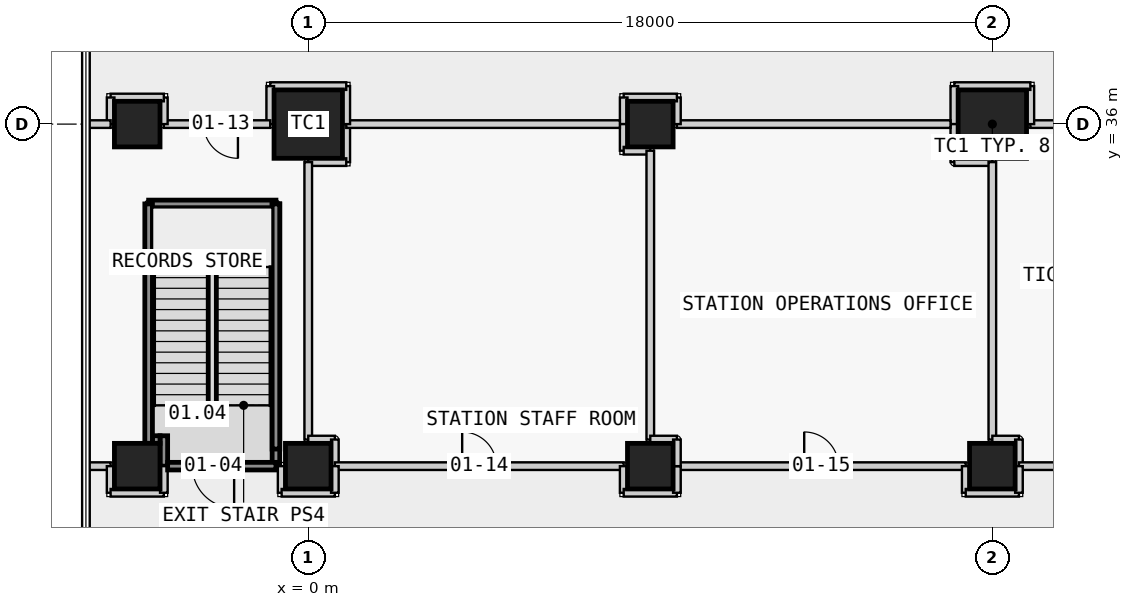
"""IFC4 building model, lengths in metres.
Left out: names, types, materials, properties, quantities, classifications, styles, units other than length and angle.
Written with IfcOpenShell. Run it as: python <this file> out.ifc"""

import sys

from ifc_helpers import new_model, si_unit, direction, frame, frame_2d, origin, origin_2d, place, context, subcontext, project, spatial, rectangle, extrude, element, fill, save


model = new_model("IFC4")
c1 = context("Model", 3, precision=1e-05, world=origin(), true_north=direction((0.0, 1.0)))
c2 = subcontext(c1, "Body", "Model", "MODEL_VIEW")
j1 = project(units=[si_unit("LENGTHUNIT", "METRE"), si_unit("PLANEANGLEUNIT", "RADIAN")], contexts=[c1])
p1 = place(None, origin())
s1 = spatial("IfcSite", under=j1, at=p1, CompositionType="ELEMENT")
p2 = place(p1, origin())
s2 = spatial("IfcBuilding", under=s1, at=p2, CompositionType="ELEMENT")
p3 = place(p2, frame((0.0, 0.0, 8.0)))
s3 = spatial("IfcBuildingStorey", under=s2, at=p3, CompositionType="ELEMENT", Elevation=8.0)
for number, where, z_axis, x_axis in (
    (1, (-4.5, 27.0, 0.0), (0.0, 0.0, 1.0), (1.0, 0.0, 0.0)),
    (2, (-4.5, 36.0, 0.0), (0.0, 0.0, 1.0), (1.0, 0.0, 0.0)),
    (3, (0.0, 27.0, 0.0), (0.0, 0.0, 1.0), (1.0, 0.0, 0.0)),
):
    element("IfcColumn", number, at=place(p3, frame(where, z_axis=z_axis, x_axis=x_axis)), inside=s3, PredefinedType="COLUMN", context=c2, shape_type="SweptSolid", body=[
        extrude(rectangle(XDim=1.2, YDim=1.2, at=origin_2d()), origin(), (0.0, 0.0, 1.0), 4.8),
    ])
p4 = place(p3, frame((0.0, 36.0, 0.0), z_axis=(0.0, 0.0, 1.0), x_axis=(1.0, 0.0, 0.0)))
e4 = element("IfcColumn", 4, at=p4, inside=s3, PredefinedType="COLUMN", context=c2, shape_type="SweptSolid", body=[
    extrude(rectangle(XDim=1.8, YDim=1.8, at=origin_2d()), origin(), (0.0, 0.0, 1.0), 4.8),
])
for number, where, z_axis, x_axis in (
    (5, (9.0, 27.0, 0.0), (0.0, 0.0, 1.0), (1.0, 0.0, 0.0)),
    (6, (9.0, 36.0, 0.0), (0.0, 0.0, 1.0), (1.0, 0.0, 0.0)),
    (7, (18.0, 27.0, 0.0), (0.0, 0.0, 1.0), (1.0, 0.0, 0.0)),
):
    element("IfcColumn", number, at=place(p3, frame(where, z_axis=z_axis, x_axis=x_axis)), inside=s3, PredefinedType="COLUMN", context=c2, shape_type="SweptSolid", body=[
        extrude(rectangle(XDim=1.2, YDim=1.2, at=origin_2d()), origin(), (0.0, 0.0, 1.0), 4.8),
    ])
p5 = place(p3, frame((18.0, 36.0, 0.0), z_axis=(0.0, 0.0, 1.0), x_axis=(1.0, 0.0, 0.0)))
e8 = element("IfcColumn", 8, at=p5, inside=s3, PredefinedType="COLUMN", context=c2, shape_type="SweptSolid", body=[
    extrude(rectangle(XDim=1.8, YDim=1.8, at=origin_2d()), origin(), (0.0, 0.0, 1.0), 4.8),
])
p6 = place(p3, frame((26.3, 36.0, 0.0), z_axis=(0.0, 0.0, 1.0), x_axis=(-1.0, 0.0, 0.0)))
e9 = element("IfcWall", 9, at=p6, inside=s3, PredefinedType="PARTITIONING", context=c2, shape_type="SweptSolid", body=[
    extrude(rectangle(XDim=7.3, YDim=0.2, at=frame_2d((3.65, 0.0))), origin(), (0.0, 0.0, 1.0), 3.75),
])
p7 = place(p6, frame((3.1, 0.0, 0.0)))
e10 = element("IfcOpeningElement", 10, at=p7, cuts=e9, PredefinedType="OPENING", context=c2, shape_type="SweptSolid", body=[
    extrude(rectangle(XDim=0.9, YDim=2.1, at=frame_2d((0.45, 1.05))), frame((0.0, 0.11, 0.0), z_axis=(0.0, -1.0, 0.0), x_axis=(1.0, 0.0, 0.0)), (0.0, 0.0, 1.0), 0.22),
])
p8 = place(p3, frame((19.0, 36.0, 0.0), z_axis=(0.0, 0.0, 1.0), x_axis=(0.0, 1.0, 0.0)))
e11 = element("IfcWall", 11, at=p8, inside=s3, PredefinedType="PARTITIONING", context=c2, shape_type="SweptSolid", body=[
    extrude(rectangle(XDim=1.0, YDim=0.2, at=frame_2d((0.5, 0.0))), origin(), (0.0, 0.0, 1.0), 3.75),
])
p9 = place(p3, frame((19.0, 37.0, 0.0), z_axis=(0.0, 0.0, 1.0), x_axis=(-1.0, 0.0, 0.0)))
e12 = element("IfcWall", 12, at=p9, inside=s3, PredefinedType="PARTITIONING", context=c2, shape_type="SweptSolid", body=[
    extrude(rectangle(XDim=2.0, YDim=0.2, at=frame_2d((1.0, 0.0))), origin(), (0.0, 0.0, 1.0), 3.75),
])
for number, where, z_axis, x_axis in (
    (13, (17.0, 37.0, 0.0), (0.0, 0.0, 1.0), (0.0, -1.0, 0.0)),
    (14, (17.0, 36.0, 0.0), (0.0, 0.0, 1.0), (0.0, -1.0, 0.0)),
    (15, (17.0, 35.0, 0.0), (0.0, 0.0, 1.0), (1.0, 0.0, 0.0)),
):
    element("IfcWall", number, at=place(p3, frame(where, z_axis=z_axis, x_axis=x_axis)), inside=s3, PredefinedType="PARTITIONING", context=c2, shape_type="SweptSolid", body=[
        extrude(rectangle(XDim=1.0, YDim=0.2, at=frame_2d((0.5, 0.0))), origin(), (0.0, 0.0, 1.0), 3.75),
    ])
p10 = place(p3, frame((18.0, 35.0, 0.0), z_axis=(0.0, 0.0, 1.0), x_axis=(0.0, -1.0, 0.0)))
e16 = element("IfcWall", 16, at=p10, inside=s3, PredefinedType="PARTITIONING", context=c2, shape_type="SweptSolid", body=[
    extrude(rectangle(XDim=7.3, YDim=0.2, at=frame_2d((3.65, 0.0))), origin(), (0.0, 0.0, 1.0), 3.75),
])
for number, where, z_axis, x_axis in (
    (17, (18.0, 27.7, 0.0), (0.0, 0.0, 1.0), (1.0, 0.0, 0.0)),
    (18, (18.7, 27.7, 0.0), (0.0, 0.0, 1.0), (0.0, -1.0, 0.0)),
):
    element("IfcWall", number, at=place(p3, frame(where, z_axis=z_axis, x_axis=x_axis)), inside=s3, PredefinedType="PARTITIONING", context=c2, shape_type="SweptSolid", body=[
        extrude(rectangle(XDim=0.7, YDim=0.2, at=frame_2d((0.35, 0.0))), origin(), (0.0, 0.0, 1.0), 3.75),
    ])
for number, where, z_axis, x_axis in (
    (19, (1.0, 36.0, 0.0), (0.0, 0.0, 1.0), (0.0, -1.0, 0.0)),
    (20, (1.0, 35.0, 0.0), (0.0, 0.0, 1.0), (-1.0, 0.0, 0.0)),
):
    element("IfcWall", number, at=place(p3, frame(where, z_axis=z_axis, x_axis=x_axis)), inside=s3, PredefinedType="PARTITIONING", context=c2, shape_type="SweptSolid", body=[
        extrude(rectangle(XDim=1.0, YDim=0.2, at=frame_2d((0.5, 0.0))), origin(), (0.0, 0.0, 1.0), 3.75),
    ])
p11 = place(p3, frame((0.0, 35.0, 0.0), z_axis=(0.0, 0.0, 1.0), x_axis=(0.0, -1.0, 0.0)))
e21 = element("IfcWall", 21, at=p11, inside=s3, PredefinedType="PARTITIONING", context=c2, shape_type="SweptSolid", body=[
    extrude(rectangle(XDim=7.3, YDim=0.2, at=frame_2d((3.65, 0.0))), origin(), (0.0, 0.0, 1.0), 3.75),
])
for number, where, z_axis, x_axis in (
    (22, (0.0, 27.7, 0.0), (0.0, 0.0, 1.0), (1.0, 0.0, 0.0)),
    (23, (0.7, 27.7, 0.0), (0.0, 0.0, 1.0), (0.0, -1.0, 0.0)),
):
    element("IfcWall", number, at=place(p3, frame(where, z_axis=z_axis, x_axis=x_axis)), inside=s3, PredefinedType="PARTITIONING", context=c2, shape_type="SweptSolid", body=[
        extrude(rectangle(XDim=0.7, YDim=0.2, at=frame_2d((0.35, 0.0))), origin(), (0.0, 0.0, 1.0), 3.75),
    ])
p12 = place(p3, frame((18.7, 27.0, 0.0), z_axis=(0.0, 0.0, 1.0), x_axis=(1.0, 0.0, 0.0)))
e24 = element("IfcWall", 24, at=p12, inside=s3, PredefinedType="PARTITIONING", context=c2, shape_type="SweptSolid", body=[
    extrude(rectangle(XDim=7.6, YDim=0.2, at=frame_2d((3.8, 0.0))), origin(), (0.0, 0.0, 1.0), 3.75),
])
p13 = place(p3, frame((9.7, 27.0, 0.0), z_axis=(0.0, 0.0, 1.0), x_axis=(1.0, 0.0, 0.0)))
e25 = element("IfcWall", 25, at=p13, inside=s3, PredefinedType="PARTITIONING", context=c2, shape_type="SweptSolid", body=[
    extrude(rectangle(XDim=7.6, YDim=0.2, at=frame_2d((3.8, 0.0))), origin(), (0.0, 0.0, 1.0), 3.75),
])
p14 = place(p13, frame((3.35, 0.0, 0.0)))
e26 = element("IfcOpeningElement", 26, at=p14, cuts=e25, PredefinedType="OPENING", context=c2, shape_type="SweptSolid", body=[
    extrude(rectangle(XDim=0.9, YDim=2.1, at=frame_2d((0.45, 1.05))), frame((0.0, 0.11, 0.0), z_axis=(0.0, -1.0, 0.0), x_axis=(1.0, 0.0, 0.0)), (0.0, 0.0, 1.0), 0.22),
])
p15 = place(p3, frame((17.3, 27.0, 0.0), z_axis=(0.0, 0.0, 1.0), x_axis=(0.0, -1.0, 0.0)))
e27 = element("IfcWall", 27, at=p15, inside=s3, PredefinedType="PARTITIONING", context=c2, shape_type="SweptSolid", body=[
    extrude(rectangle(XDim=0.7, YDim=0.2, at=frame_2d((0.35, 0.0))), origin(), (0.0, 0.0, 1.0), 3.75),
])
p16 = place(p3, frame((17.3, 26.3, 0.0), z_axis=(0.0, 0.0, 1.0), x_axis=(1.0, 0.0, 0.0)))
e28 = element("IfcWall", 28, at=p16, inside=s3, PredefinedType="PARTITIONING", context=c2, shape_type="SweptSolid", body=[
    extrude(rectangle(XDim=1.4, YDim=0.2, at=frame_2d((0.7, 0.0))), origin(), (0.0, 0.0, 1.0), 4.45),
])
p17 = place(p3, frame((18.7, 26.3, 0.0), z_axis=(0.0, 0.0, 1.0), x_axis=(0.0, 1.0, 0.0)))
e29 = element("IfcWall", 29, at=p17, inside=s3, PredefinedType="PARTITIONING", context=c2, shape_type="SweptSolid", body=[
    extrude(rectangle(XDim=0.7, YDim=0.2, at=frame_2d((0.35, 0.0))), origin(), (0.0, 0.0, 1.0), 3.75),
])
p18 = place(p3, frame((0.7, 27.0, 0.0), z_axis=(0.0, 0.0, 1.0), x_axis=(1.0, 0.0, 0.0)))
e30 = element("IfcWall", 30, at=p18, inside=s3, PredefinedType="PARTITIONING", context=c2, shape_type="SweptSolid", body=[
    extrude(rectangle(XDim=7.6, YDim=0.2, at=frame_2d((3.8, 0.0))), origin(), (0.0, 0.0, 1.0), 3.75),
])
p19 = place(p18, frame((3.35, 0.0, 0.0)))
e31 = element("IfcOpeningElement", 31, at=p19, cuts=e30, PredefinedType="OPENING", context=c2, shape_type="SweptSolid", body=[
    extrude(rectangle(XDim=0.9, YDim=2.1, at=frame_2d((0.45, 1.05))), frame((0.0, 0.11, 0.0), z_axis=(0.0, -1.0, 0.0), x_axis=(1.0, 0.0, 0.0)), (0.0, 0.0, 1.0), 0.22),
])
p20 = place(p3, frame((8.3, 27.0, 0.0), z_axis=(0.0, 0.0, 1.0), x_axis=(0.0, -1.0, 0.0)))
e32 = element("IfcWall", 32, at=p20, inside=s3, PredefinedType="PARTITIONING", context=c2, shape_type="SweptSolid", body=[
    extrude(rectangle(XDim=0.7, YDim=0.2, at=frame_2d((0.35, 0.0))), origin(), (0.0, 0.0, 1.0), 3.75),
])
p21 = place(p3, frame((8.3, 26.3, 0.0), z_axis=(0.0, 0.0, 1.0), x_axis=(1.0, 0.0, 0.0)))
e33 = element("IfcWall", 33, at=p21, inside=s3, PredefinedType="PARTITIONING", context=c2, shape_type="SweptSolid", body=[
    extrude(rectangle(XDim=1.4, YDim=0.2, at=frame_2d((0.7, 0.0))), origin(), (0.0, 0.0, 1.0), 4.45),
])
p22 = place(p3, frame((9.7, 26.3, 0.0), z_axis=(0.0, 0.0, 1.0), x_axis=(0.0, 1.0, 0.0)))
e34 = element("IfcWall", 34, at=p22, inside=s3, PredefinedType="PARTITIONING", context=c2, shape_type="SweptSolid", body=[
    extrude(rectangle(XDim=0.7, YDim=0.2, at=frame_2d((0.35, 0.0))), origin(), (0.0, 0.0, 1.0), 3.75),
])
p23 = place(p3, frame((-4.2, 33.9, 0.0), z_axis=(0.0, 0.0, 1.0), x_axis=(1.0, 0.0, 0.0)))
e35 = element("IfcWall", 35, at=p23, inside=s3, PredefinedType="PARTITIONING", context=c2, shape_type="SweptSolid", body=[
    extrude(rectangle(XDim=3.35, YDim=0.2, at=frame_2d((1.675, 0.0))), origin(), (0.0, 0.0, 1.0), 4.45),
])
p24 = place(p3, frame((-0.85, 33.9, 0.0), z_axis=(0.0, 0.0, 1.0), x_axis=(0.0, -1.0, 0.0)))
e36 = element("IfcWall", 36, at=p24, inside=s3, PredefinedType="PARTITIONING", context=c2, shape_type="SweptSolid", body=[
    extrude(rectangle(XDim=6.9, YDim=0.2, at=frame_2d((3.45, 0.0))), origin(), (0.0, 0.0, 1.0), 3.75),
])
p25 = place(p3, frame((16.9, 36.0, 0.0), z_axis=(0.0, 0.0, 1.0), x_axis=(-1.0, 0.0, 0.0)))
e37 = element("IfcWall", 37, at=p25, inside=s3, PredefinedType="PARTITIONING", context=c2, shape_type="SweptSolid", body=[
    extrude(rectangle(XDim=7.2, YDim=0.2, at=frame_2d((3.6, 0.0))), origin(), (0.0, 0.0, 1.0), 3.75),
])
p26 = place(p3, frame((9.7, 36.0, 0.0), z_axis=(0.0, 0.0, 1.0), x_axis=(0.0, 1.0, 0.0)))
e38 = element("IfcWall", 38, at=p26, inside=s3, PredefinedType="PARTITIONING", context=c2, shape_type="SweptSolid", body=[
    extrude(rectangle(XDim=0.7, YDim=0.2, at=frame_2d((0.35, 0.0))), origin(), (0.0, 0.0, 1.0), 3.75),
])
p27 = place(p3, frame((9.7, 36.7, 0.0), z_axis=(0.0, 0.0, 1.0), x_axis=(-1.0, 0.0, 0.0)))
e39 = element("IfcWall", 39, at=p27, inside=s3, PredefinedType="PARTITIONING", context=c2, shape_type="SweptSolid", body=[
    extrude(rectangle(XDim=1.4, YDim=0.2, at=frame_2d((0.7, 0.0))), origin(), (0.0, 0.0, 1.0), 4.45),
])
for number, where, z_axis, x_axis in (
    (40, (8.3, 36.7, 0.0), (0.0, 0.0, 1.0), (0.0, -1.0, 0.0)),
    (41, (8.3, 36.0, 0.0), (0.0, 0.0, 1.0), (0.0, -1.0, 0.0)),
    (42, (8.3, 35.3, 0.0), (0.0, 0.0, 1.0), (1.0, 0.0, 0.0)),
):
    element("IfcWall", number, at=place(p3, frame(where, z_axis=z_axis, x_axis=x_axis)), inside=s3, PredefinedType="PARTITIONING", context=c2, shape_type="SweptSolid", body=[
        extrude(rectangle(XDim=0.7, YDim=0.2, at=frame_2d((0.35, 0.0))), origin(), (0.0, 0.0, 1.0), 3.75),
    ])
p28 = place(p3, frame((9.0, 35.3, 0.0), z_axis=(0.0, 0.0, 1.0), x_axis=(0.0, -1.0, 0.0)))
e43 = element("IfcWall", 43, at=p28, inside=s3, PredefinedType="PARTITIONING", context=c2, shape_type="SweptSolid", body=[
    extrude(rectangle(XDim=7.6, YDim=0.2, at=frame_2d((3.8, 0.0))), origin(), (0.0, 0.0, 1.0), 3.75),
])
p29 = place(p3, frame((8.2, 36.0, 0.0), z_axis=(0.0, 0.0, 1.0), x_axis=(-1.0, 0.0, 0.0)))
e44 = element("IfcWall", 44, at=p29, inside=s3, PredefinedType="PARTITIONING", context=c2, shape_type="SweptSolid", body=[
    extrude(rectangle(XDim=7.2, YDim=0.2, at=frame_2d((3.6, 0.0))), origin(), (0.0, 0.0, 1.0), 3.75),
])
p30 = place(p3, frame((-3.8, 27.0, 0.0), z_axis=(0.0, 0.0, 1.0), x_axis=(0.0, 1.0, 0.0)))
e45 = element("IfcWall", 45, at=p30, inside=s3, PredefinedType="PARTITIONING", context=c2, shape_type="SweptSolid", body=[
    extrude(rectangle(XDim=0.8, YDim=0.2, at=frame_2d((0.4, 0.0))), origin(), (0.0, 0.0, 1.0), 3.75),
])
p31 = place(p3, frame((-3.9, 27.7, 0.0), z_axis=(0.0, 0.0, 1.0), x_axis=(-1.0, 0.0, 0.0)))
e46 = element("IfcWall", 46, at=p31, inside=s3, PredefinedType="PARTITIONING", context=c2, shape_type="SweptSolid", body=[
    extrude(rectangle(XDim=0.2, YDim=0.2, at=frame_2d((0.1, 0.0))), origin(), (0.0, 0.0, 1.0), 4.45),
])
p32 = place(p3, frame((-4.2, 27.6, 0.0), z_axis=(0.0, 0.0, 1.0), x_axis=(0.0, 1.0, 0.0)))
e47 = element("IfcWall", 47, at=p32, inside=s3, PredefinedType="PARTITIONING", context=c2, shape_type="SweptSolid", body=[
    extrude(rectangle(XDim=6.3, YDim=0.2, at=frame_2d((3.15, 0.0))), origin(), (0.0, 0.0, 1.0), 4.45),
])
p33 = place(p3, frame((1.0, 36.0, 0.0), z_axis=(0.0, 0.0, 1.0), x_axis=(0.0, 1.0, 0.0)))
e48 = element("IfcWall", 48, at=p33, inside=s3, PredefinedType="PARTITIONING", context=c2, shape_type="SweptSolid", body=[
    extrude(rectangle(XDim=1.0, YDim=0.2, at=frame_2d((0.5, 0.0))), origin(), (0.0, 0.0, 1.0), 3.75),
])
p34 = place(p3, frame((1.0, 37.0, 0.0), z_axis=(0.0, 0.0, 1.0), x_axis=(-1.0, 0.0, 0.0)))
e49 = element("IfcWall", 49, at=p34, inside=s3, PredefinedType="PARTITIONING", context=c2, shape_type="SweptSolid", body=[
    extrude(rectangle(XDim=2.0, YDim=0.2, at=frame_2d((1.0, 0.0))), origin(), (0.0, 0.0, 1.0), 3.75),
])
p35 = place(p3, frame((-1.0, 37.0, 0.0), z_axis=(0.0, 0.0, 1.0), x_axis=(0.0, -1.0, 0.0)))
e50 = element("IfcWall", 50, at=p35, inside=s3, PredefinedType="PARTITIONING", context=c2, shape_type="SweptSolid", body=[
    extrude(rectangle(XDim=1.0, YDim=0.2, at=frame_2d((0.5, 0.0))), origin(), (0.0, 0.0, 1.0), 3.75),
])
p36 = place(p3, frame((-1.0, 36.0, 0.0), z_axis=(0.0, 0.0, 1.0), x_axis=(-1.0, 0.0, 0.0)))
e51 = element("IfcWall", 51, at=p36, inside=s3, PredefinedType="PARTITIONING", context=c2, shape_type="SweptSolid", body=[
    extrude(rectangle(XDim=2.8, YDim=0.2, at=frame_2d((1.4, 0.0))), origin(), (0.0, 0.0, 1.0), 3.75),
])
p37 = place(p36, frame((0.85, 0.0, 0.0)))
e52 = element("IfcOpeningElement", 52, at=p37, cuts=e51, PredefinedType="OPENING", context=c2, shape_type="SweptSolid", body=[
    extrude(rectangle(XDim=0.9, YDim=2.1, at=frame_2d((0.45, 1.05))), frame((0.0, 0.11, 0.0), z_axis=(0.0, -1.0, 0.0), x_axis=(1.0, 0.0, 0.0)), (0.0, 0.0, 1.0), 0.22),
])
p38 = place(p3, frame((-5.85, 27.0, 0.0), z_axis=(0.0, 0.0, 1.0), x_axis=(1.0, 0.0, 0.0)))
e53 = element("IfcWall", 53, at=p38, inside=s3, PredefinedType="PARTITIONING", context=c2, shape_type="SweptSolid", body=[
    extrude(rectangle(XDim=0.65, YDim=0.2, at=frame_2d((0.325, 0.0))), origin(), (0.0, 0.0, 1.0), 4.45),
])
p39 = place(p3, frame((-5.2, 27.0, 0.0), z_axis=(0.0, 0.0, 1.0), x_axis=(0.0, -1.0, 0.0)))
e54 = element("IfcWall", 54, at=p39, inside=s3, PredefinedType="PARTITIONING", context=c2, shape_type="SweptSolid", body=[
    extrude(rectangle(XDim=0.7, YDim=0.2, at=frame_2d((0.35, 0.0))), origin(), (0.0, 0.0, 1.0), 4.45),
])
p40 = place(p3, frame((-5.2, 26.3, 0.0), z_axis=(0.0, 0.0, 1.0), x_axis=(1.0, 0.0, 0.0)))
e55 = element("IfcWall", 55, at=p40, inside=s3, PredefinedType="PARTITIONING", context=c2, shape_type="SweptSolid", body=[
    extrude(rectangle(XDim=1.4, YDim=0.2, at=frame_2d((0.7, 0.0))), origin(), (0.0, 0.0, 1.0), 3.75),
])
for number, where, z_axis, x_axis in (
    (56, (-3.8, 26.3, 0.0), (0.0, 0.0, 1.0), (0.0, 1.0, 0.0)),
    (57, (-3.8, 36.0, 0.0), (0.0, 0.0, 1.0), (0.0, 1.0, 0.0)),
):
    element("IfcWall", number, at=place(p3, frame(where, z_axis=z_axis, x_axis=x_axis)), inside=s3, PredefinedType="PARTITIONING", context=c2, shape_type="SweptSolid", body=[
        extrude(rectangle(XDim=0.7, YDim=0.2, at=frame_2d((0.35, 0.0))), origin(), (0.0, 0.0, 1.0), 3.75),
    ])
p41 = place(p3, frame((-3.8, 36.7, 0.0), z_axis=(0.0, 0.0, 1.0), x_axis=(-1.0, 0.0, 0.0)))
e58 = element("IfcWall", 58, at=p41, inside=s3, PredefinedType="PARTITIONING", context=c2, shape_type="SweptSolid", body=[
    extrude(rectangle(XDim=1.4, YDim=0.2, at=frame_2d((0.7, 0.0))), origin(), (0.0, 0.0, 1.0), 3.75),
])
p42 = place(p3, frame((-5.2, 36.7, 0.0), z_axis=(0.0, 0.0, 1.0), x_axis=(0.0, -1.0, 0.0)))
e59 = element("IfcWall", 59, at=p42, inside=s3, PredefinedType="PARTITIONING", context=c2, shape_type="SweptSolid", body=[
    extrude(rectangle(XDim=0.7, YDim=0.2, at=frame_2d((0.35, 0.0))), origin(), (0.0, 0.0, 1.0), 4.45),
])
p43 = place(p3, frame((-5.2, 36.0, 0.0), z_axis=(0.0, 0.0, 1.0), x_axis=(-1.0, 0.0, 0.0)))
e60 = element("IfcWall", 60, at=p43, inside=s3, PredefinedType="PARTITIONING", context=c2, shape_type="SweptSolid", body=[
    extrude(rectangle(XDim=0.65, YDim=0.2, at=frame_2d((0.325, 0.0))), origin(), (0.0, 0.0, 1.0), 4.45),
])
p44 = place(p3, frame((-0.85, 27.0, 0.0), z_axis=(0.0, 0.0, 1.0), x_axis=(-1.0, 0.0, 0.0)))
e61 = element("IfcWall", 61, at=p44, inside=s3, PredefinedType="PARTITIONING", context=c2, shape_type="SweptSolid", body=[
    extrude(rectangle(XDim=2.85, YDim=0.2, at=frame_2d((1.425, 0.0))), origin(), (0.0, 0.0, 1.0), 3.75),
])
p45 = place(p44, frame((1.1, 0.0, 0.0)))
e62 = element("IfcOpeningElement", 62, at=p45, cuts=e61, PredefinedType="OPENING", context=c2, shape_type="SweptSolid", body=[
    extrude(rectangle(XDim=1.1, YDim=2.1, at=frame_2d((0.55, 1.05))), frame((0.0, 0.11, 0.0), z_axis=(0.0, -1.0, 0.0), x_axis=(1.0, 0.0, 0.0)), (0.0, 0.0, 1.0), 0.22),
])
p46 = place(p3, frame((-0.7, 27.0, 0.0), z_axis=(0.0, 0.0, 1.0), x_axis=(0.0, -1.0, 0.0)))
e63 = element("IfcWall", 63, at=p46, inside=s3, PredefinedType="PARTITIONING", context=c2, shape_type="SweptSolid", body=[
    extrude(rectangle(XDim=0.7, YDim=0.2, at=frame_2d((0.35, 0.0))), origin(), (0.0, 0.0, 1.0), 3.75),
])
p47 = place(p3, frame((-0.7, 26.3, 0.0), z_axis=(0.0, 0.0, 1.0), x_axis=(1.0, 0.0, 0.0)))
e64 = element("IfcWall", 64, at=p47, inside=s3, PredefinedType="PARTITIONING", context=c2, shape_type="SweptSolid", body=[
    extrude(rectangle(XDim=1.4, YDim=0.2, at=frame_2d((0.7, 0.0))), origin(), (0.0, 0.0, 1.0), 4.45),
])
for number, where, z_axis, x_axis in (
    (65, (9.0, 27.7, 0.0), (0.0, 0.0, 1.0), (1.0, 0.0, 0.0)),
    (66, (9.7, 27.7, 0.0), (0.0, 0.0, 1.0), (0.0, -1.0, 0.0)),
    (67, (0.7, 26.3, 0.0), (0.0, 0.0, 1.0), (0.0, 1.0, 0.0)),
):
    element("IfcWall", number, at=place(p3, frame(where, z_axis=z_axis, x_axis=x_axis)), inside=s3, PredefinedType="PARTITIONING", context=c2, shape_type="SweptSolid", body=[
        extrude(rectangle(XDim=0.7, YDim=0.2, at=frame_2d((0.35, 0.0))), origin(), (0.0, 0.0, 1.0), 3.75),
    ])
p48 = place(p3, frame((-0.85, 33.9, 3.75), z_axis=(0.0, 0.0, 1.0), x_axis=(0.0, -1.0, 0.0)))
e68 = element("IfcWall", 68, at=p48, inside=s3, PredefinedType="PARTITIONING", context=c2, shape_type="SweptSolid", body=[
    extrude(rectangle(XDim=6.45, YDim=0.2, at=frame_2d((3.225, 0.0))), origin(), (0.0, 0.0, 1.0), 0.7),
])
p49 = place(p45, origin())
e69 = element("IfcDoor", 69, at=p49, inside=s3, OperationType="SINGLE_SWING_LEFT", PredefinedType="DOOR", context=c2, shape_type="SweptSolid", body=[
    extrude(rectangle(XDim=1.1, YDim=2.1, at=frame_2d((0.55, 1.05))), frame((0.0, 0.025, 0.0), z_axis=(0.0, -1.0, 0.0), x_axis=(1.0, 0.0, 0.0)), (0.0, 0.0, 1.0), 0.05),
])
fill(e62, e69)
p50 = place(p37, origin())
e70 = element("IfcDoor", 70, at=p50, inside=s3, OperationType="SINGLE_SWING_LEFT", PredefinedType="DOOR", context=c2, shape_type="SweptSolid", body=[
    extrude(rectangle(XDim=0.9, YDim=2.1, at=frame_2d((0.45, 1.05))), frame((0.0, 0.025, 0.0), z_axis=(0.0, -1.0, 0.0), x_axis=(1.0, 0.0, 0.0)), (0.0, 0.0, 1.0), 0.05),
])
fill(e52, e70)
p51 = place(p19, origin())
e71 = element("IfcDoor", 71, at=p51, inside=s3, OperationType="SINGLE_SWING_LEFT", PredefinedType="DOOR", context=c2, shape_type="SweptSolid", body=[
    extrude(rectangle(XDim=0.9, YDim=2.1, at=frame_2d((0.45, 1.05))), frame((0.0, 0.025, 0.0), z_axis=(0.0, -1.0, 0.0), x_axis=(1.0, 0.0, 0.0)), (0.0, 0.0, 1.0), 0.05),
])
fill(e31, e71)
p52 = place(p14, origin())
e72 = element("IfcDoor", 72, at=p52, inside=s3, OperationType="SINGLE_SWING_LEFT", PredefinedType="DOOR", context=c2, shape_type="SweptSolid", body=[
    extrude(rectangle(XDim=0.9, YDim=2.1, at=frame_2d((0.45, 1.05))), frame((0.0, 0.025, 0.0), z_axis=(0.0, -1.0, 0.0), x_axis=(1.0, 0.0, 0.0)), (0.0, 0.0, 1.0), 0.05),
])
fill(e26, e72)
save(model, sys.argv[1])
